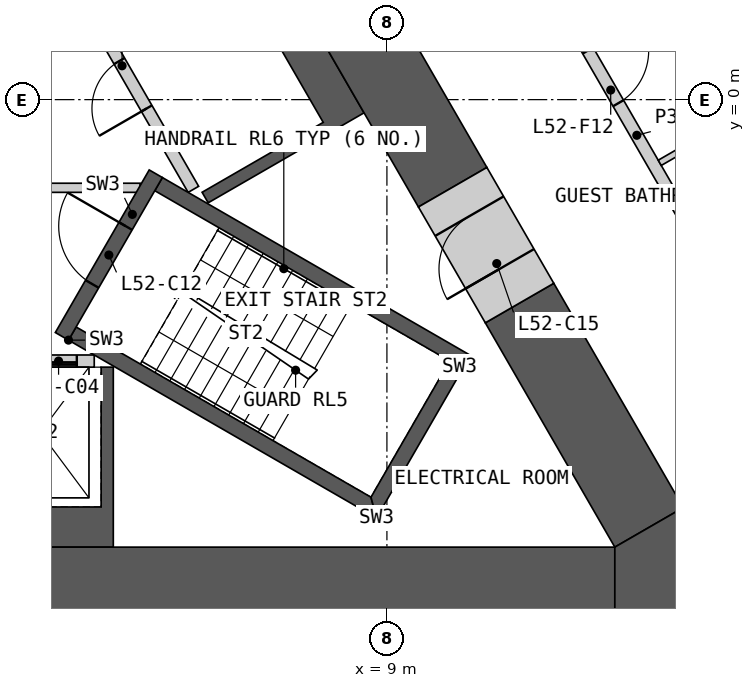
"""IFC4 building model, lengths in metres.
Left out: names, types, materials, properties, quantities, classifications, styles, units other than length and angle.
Written with IfcOpenShell. Run it as: python <this file> out.ifc"""

import sys

from ifc_helpers import new_model, si_unit, direction, frame, frame_2d, origin, place, context, subcontext, project, spatial, polyline, rectangle, outline, extrude, element, fill, save


model = new_model("IFC4")
c1 = context("Model", 3, precision=1e-05, world=origin(), true_north=direction((0.0, 1.0)))
c2 = subcontext(c1, "Body", "Model", "MODEL_VIEW")
j1 = project(units=[si_unit("LENGTHUNIT", "METRE"), si_unit("PLANEANGLEUNIT", "RADIAN")], contexts=[c1])
p1 = place(None, origin())
s1 = spatial("IfcSite", under=j1, at=p1, CompositionType="ELEMENT")
p2 = place(p1, origin())
s2 = spatial("IfcBuilding", under=s1, at=p2, CompositionType="ELEMENT")
p3 = place(p2, frame((0.0, 0.0, 238.2)))
s3 = spatial("IfcBuildingStorey", under=s2, at=p3, CompositionType="ELEMENT", Elevation=238.2)
p4 = place(p3, origin())
e1 = element("IfcWall", 1, at=p4, inside=s3, PredefinedType="SHEAR", context=c2, shape_type="SweptSolid", body=[
    extrude(outline(polyline([(2.1, -7.36), (2.1, -4.4), (2.3, -4.4), (2.3, -6.7), (4.3, -6.7), (4.3, -4.4), (4.5, -4.4), (4.5, -7.36), (2.1, -7.36)])), origin(), (0.0, 0.0, 1.0), 3.25),
])
p5 = place(p3, frame((-4.187, -4.3, 0.0), z_axis=(0.0, 0.0, 1.0), x_axis=(1.0, 0.0, 0.0)))
e2 = element("IfcWall", 2, at=p5, inside=s3, PredefinedType="SOLIDWALL", context=c2, shape_type="SweptSolid", body=[
    extrude(rectangle(XDim=8.373, YDim=0.2, at=frame_2d((4.187, 0.0))), origin(), (0.0, 0.0, 1.0), 3.25),
])
p6 = place(p5, frame((0.287, 0.0, 0.0)))
e3 = element("IfcOpeningElement", 3, at=p6, cuts=e2, PredefinedType="OPENING", context=c2, shape_type="SweptSolid", body=[
    extrude(rectangle(XDim=1.2, YDim=2.1, at=frame_2d((0.6, 1.05))), frame((0.0, 0.11, 0.0), z_axis=(0.0, -1.0, 0.0), x_axis=(1.0, 0.0, 0.0)), (0.0, 0.0, 1.0), 0.22),
])
p7 = place(p5, frame((2.387, 0.0, 0.0)))
e4 = element("IfcOpeningElement", 4, at=p7, cuts=e2, PredefinedType="OPENING", context=c2, shape_type="SweptSolid", body=[
    extrude(rectangle(XDim=1.4, YDim=2.1, at=frame_2d((0.7, 1.05))), frame((0.0, 0.11, 0.0), z_axis=(0.0, -1.0, 0.0), x_axis=(1.0, 0.0, 0.0)), (0.0, 0.0, 1.0), 0.22),
])
p8 = place(p5, frame((4.837, 0.0, 0.0)))
e5 = element("IfcOpeningElement", 5, at=p8, cuts=e2, PredefinedType="OPENING", context=c2, shape_type="SweptSolid", body=[
    extrude(rectangle(XDim=0.9, YDim=2.1, at=frame_2d((0.45, 1.05))), frame((0.0, 0.11, 0.0), z_axis=(0.0, -1.0, 0.0), x_axis=(1.0, 0.0, 0.0)), (0.0, 0.0, 1.0), 0.22),
])
p9 = place(p5, frame((6.887, 0.0, 0.0)))
e6 = element("IfcOpeningElement", 6, at=p9, cuts=e2, PredefinedType="OPENING", context=c2, shape_type="SweptSolid", body=[
    extrude(rectangle(XDim=1.2, YDim=2.1, at=frame_2d((0.6, 1.05))), frame((0.0, 0.11, 0.0), z_axis=(0.0, -1.0, 0.0), x_axis=(1.0, 0.0, 0.0)), (0.0, 0.0, 1.0), 0.22),
])
p10 = place(p3, origin())
e7 = element("IfcWall", 7, at=p10, inside=s3, PredefinedType="SHEAR", context=c2, shape_type="SweptSolid", body=[
    extrude(outline(polyline([(6.324, 3.767), (8.624, -0.217), (8.231, -0.444), (6.061, -1.697), (5.96, -1.524), (7.952, -0.374), (5.852, 3.263), (3.861, 2.113), (3.76, 2.287), (5.931, 3.54), (6.324, 3.767)])), origin(), (0.0, 0.0, 1.0), 3.25),
])
p11 = place(p3, frame((5.817, -1.476, 0.0), z_axis=(0.0, 0.0, 1.0), x_axis=(-0.500002616675, 0.866023893041, 0.0)))
e8 = element("IfcWall", 8, at=p11, inside=s3, PredefinedType="SOLIDWALL", context=c2, shape_type="SweptSolid", body=[
    extrude(rectangle(XDim=8.373, YDim=0.2, at=frame_2d((4.187, 0.0))), origin(), (0.0, 0.0, 1.0), 3.25),
])
p12 = place(p11, frame((1.537, 0.0, 0.0)))
e9 = element("IfcOpeningElement", 9, at=p12, cuts=e8, PredefinedType="OPENING", context=c2, shape_type="SweptSolid", body=[
    extrude(rectangle(XDim=0.9, YDim=2.1, at=frame_2d((0.45, 1.05))), frame((0.0, 0.11, 0.0), z_axis=(0.0, -1.0, 0.0), x_axis=(1.0, 0.0, 0.0)), (0.0, 0.0, 1.0), 0.22),
])
p13 = place(p11, frame((4.837, 0.0, 0.0)))
e10 = element("IfcOpeningElement", 10, at=p13, cuts=e8, PredefinedType="OPENING", context=c2, shape_type="SweptSolid", body=[
    extrude(rectangle(XDim=0.9, YDim=2.1, at=frame_2d((0.45, 1.05))), frame((0.0, 0.11, 0.0), z_axis=(0.0, -1.0, 0.0), x_axis=(1.0, 0.0, 0.0)), (0.0, 0.0, 1.0), 0.22),
])
p14 = place(p11, frame((6.937, 0.0, 0.0)))
e11 = element("IfcOpeningElement", 11, at=p14, cuts=e8, PredefinedType="OPENING", context=c2, shape_type="SweptSolid", body=[
    extrude(rectangle(XDim=1.1, YDim=2.1, at=frame_2d((0.55, 1.05))), frame((0.0, 0.11, 0.0), z_axis=(0.0, -1.0, 0.0), x_axis=(1.0, 0.0, 0.0)), (0.0, 0.0, 1.0), 0.22),
])
p15 = place(p3, frame((-4.941, -1.45, 0.0), z_axis=(0.0, 0.0, 1.0), x_axis=(1.0, 0.0, 0.0)))
e12 = element("IfcWall", 12, at=p15, inside=s3, PredefinedType="PARTITIONING", context=c2, shape_type="SweptSolid", body=[
    extrude(rectangle(XDim=9.882, YDim=0.15, at=frame_2d((4.941, 0.0))), origin(), (0.0, 0.0, 1.0), 3.25),
])
p16 = place(p15, frame((4.391, 0.0, 0.0)))
e13 = element("IfcOpeningElement", 13, at=p16, cuts=e12, PredefinedType="OPENING", context=c2, shape_type="SweptSolid", body=[
    extrude(rectangle(XDim=1.1, YDim=2.1, at=frame_2d((0.55, 1.05))), frame((0.0, 0.085, 0.0), z_axis=(0.0, -1.0, 0.0), x_axis=(1.0, 0.0, 0.0)), (0.0, 0.0, 1.0), 0.17),
])
p17 = place(p3, origin())
e14 = element("IfcWall", 14, at=p17, inside=s3, PredefinedType="SHEAR", context=c2, shape_type="SweptSolid", body=[
    extrude(outline(polyline([(3.763, -3.956), (8.83, -6.881), (8.738, -6.539), (3.888, -3.739), (3.763, -3.956)])), origin(), (0.0, 0.0, 1.0), 3.25),
])
p18 = place(p3, origin())
e15 = element("IfcWall", 15, at=p18, inside=s3, PredefinedType="SHEAR", context=c2, shape_type="SweptSolid", body=[
    extrude(outline(polyline([(8.83, -6.881), (10.374, -4.206), (10.032, -4.298), (8.738, -6.539), (8.83, -6.881)])), origin(), (0.0, 0.0, 1.0), 3.25),
])
p19 = place(p3, origin())
e16 = element("IfcWall", 16, at=p19, inside=s3, PredefinedType="SHEAR", context=c2, shape_type="SweptSolid", body=[
    extrude(outline(polyline([(10.032, -4.298), (10.374, -4.206), (5.307, -1.281), (5.182, -1.498), (10.032, -4.298)])), origin(), (0.0, 0.0, 1.0), 3.25),
])
p20 = place(p3, frame((3.655, -3.893, 0.0), z_axis=(0.0, 0.0, 1.0), x_axis=(0.499982516597, 0.866035497597, 0.0)))
e17 = element("IfcWall", 17, at=p20, inside=s3, PredefinedType="SHEAR", context=c2, shape_type="SweptSolid", body=[
    extrude(rectangle(XDim=3.088, YDim=0.25, at=frame_2d((1.544, 0.0))), origin(), (0.0, 0.0, 1.0), 3.25),
])
p21 = place(p20, frame((0.994, 0.0, 0.0)))
e18 = element("IfcOpeningElement", 18, at=p21, cuts=e17, PredefinedType="OPENING", context=c2, shape_type="SweptSolid", body=[
    extrude(rectangle(XDim=1.1, YDim=2.1, at=frame_2d((0.55, 1.05))), frame((0.0, 0.135, 0.0), z_axis=(0.0, -1.0, 0.0), x_axis=(1.0, 0.0, 0.0)), (0.0, 0.0, 1.0), 0.27),
])
p22 = place(p3, frame((-12.748, -8.01, 0.0), z_axis=(0.0, 0.0, 1.0), x_axis=(1.0, 0.0, 0.0)))
e19 = element("IfcWall", 19, at=p22, inside=s3, PredefinedType="SHEAR", context=c2, shape_type="SweptSolid", body=[
    extrude(rectangle(XDim=25.497, YDim=1.3, at=frame_2d((12.748, 0.0))), origin(), (0.0, 0.0, 1.0), 3.25),
])
p23 = place(p3, frame((10.081, -1.441, 0.0), z_axis=(0.0, 0.0, 1.0), x_axis=(-0.500012180433, 0.866018371294, 0.0)))
e20 = element("IfcWall", 20, at=p23, inside=s3, PredefinedType="SHEAR", context=c2, shape_type="SweptSolid", body=[
    extrude(rectangle(XDim=15.05, YDim=1.3, at=frame_2d((7.525, 0.0))), origin(), (0.0, 0.0, 1.0), 3.25),
])
p24 = place(p3, frame((13.311, -7.035, 0.0), z_axis=(0.0, 0.0, 1.0), x_axis=(-0.500003555838, 0.866023350811, 0.0)))
e21 = element("IfcWall", 21, at=p24, inside=s3, PredefinedType="SHEAR", context=c2, shape_type="SweptSolid", body=[
    extrude(rectangle(XDim=4.26, YDim=1.3, at=frame_2d((2.13, 0.0))), origin(), (0.0, 0.0, 1.0), 3.25),
])
p25 = place(p3, origin())
e22 = element("IfcWall", 22, at=p25, inside=s3, PredefinedType="SHEAR", context=c2, shape_type="SweptSolid", body=[
    extrude(outline(polyline([(12.748, -8.66), (12.748, -7.36), (13.874, -6.71), (15.0, -8.66), (12.748, -8.66)])), origin(), (0.0, 0.0, 1.0), 3.25),
])
p26 = place(p3, frame((11.181, -3.346, 0.0), z_axis=(0.0, 0.0, 1.0), x_axis=(-0.499946605688, 0.86605622881, 0.0)))
e23 = element("IfcWall", 23, at=p26, inside=s3, PredefinedType="SHEAR", context=c2, shape_type="SweptSolid", body=[
    extrude(rectangle(XDim=2.2, YDim=1.3, at=frame_2d((1.1, 0.0))), origin(), (0.0, 0.0, 1.0), 3.25),
])
p27 = place(p26, frame((0.65, 0.0, 0.0)))
e24 = element("IfcOpeningElement", 24, at=p27, cuts=e23, PredefinedType="OPENING", context=c2, shape_type="SweptSolid", body=[
    extrude(rectangle(XDim=1.0, YDim=2.1, at=frame_2d((0.5, 1.05))), frame((0.0, 0.66, 0.0), z_axis=(0.0, -1.0, 0.0), x_axis=(1.0, 0.0, 0.0)), (0.0, 0.0, 1.0), 1.32),
])
p28 = place(p3, frame((9.699, 5.321, 0.0), z_axis=(0.0, 0.0, 1.0), x_axis=(0.49998193945, -0.866035830797, 0.0)))
e25 = element("IfcWall", 25, at=p28, inside=s3, PredefinedType="PARTITIONING", context=c2, shape_type="SweptSolid", body=[
    extrude(rectangle(XDim=9.094, YDim=0.2, at=frame_2d((4.547, 0.0))), origin(), (0.0, 0.0, 1.0), 3.25),
])
p29 = place(p28, frame((5.212, 0.0, 0.0)))
e26 = element("IfcOpeningElement", 26, at=p29, cuts=e25, PredefinedType="OPENING", context=c2, shape_type="SweptSolid", body=[
    extrude(rectangle(XDim=1.0, YDim=2.1, at=frame_2d((0.5, 1.05))), frame((0.0, 0.11, 0.0), z_axis=(0.0, -1.0, 0.0), x_axis=(1.0, 0.0, 0.0)), (0.0, 0.0, 1.0), 0.22),
])
p30 = place(p28, frame((1.162, 0.0, 0.0)))
e27 = element("IfcOpeningElement", 27, at=p30, cuts=e25, PredefinedType="OPENING", context=c2, shape_type="SweptSolid", body=[
    extrude(rectangle(XDim=1.1, YDim=2.1, at=frame_2d((0.55, 1.05))), frame((0.0, 0.11, 0.0), z_axis=(0.0, -1.0, 0.0), x_axis=(1.0, 0.0, 0.0)), (0.0, 0.0, 1.0), 0.22),
])
p31 = place(p3, frame((13.487, -1.04, 0.0), z_axis=(0.0, 0.0, 1.0), x_axis=(0.866032905446, 0.499987006516, 0.0)))
e28 = element("IfcWall", 28, at=p31, inside=s3, PredefinedType="PARTITIONING", context=c2, shape_type="SweptSolid", body=[
    extrude(rectangle(XDim=2.45, YDim=0.1, at=frame_2d((1.225, 0.0))), origin(), (0.0, 0.0, 1.0), 2.404),
])
p32 = place(p9, origin())
e29 = element("IfcDoor", 29, at=p32, inside=s3, OperationType="SLIDING_TO_LEFT", PredefinedType="DOOR", context=c2, shape_type="SweptSolid", body=[
    extrude(rectangle(XDim=1.2, YDim=2.1, at=frame_2d((0.6, 1.05))), frame((0.0, 0.025, 0.0), z_axis=(0.0, -1.0, 0.0), x_axis=(1.0, 0.0, 0.0)), (0.0, 0.0, 1.0), 0.05),
])
fill(e6, e29)
p33 = place(p12, origin())
e30 = element("IfcDoor", 30, at=p33, inside=s3, OperationType="SINGLE_SWING_LEFT", PredefinedType="DOOR", context=c2, shape_type="SweptSolid", body=[
    extrude(rectangle(XDim=0.9, YDim=2.1, at=frame_2d((0.45, 1.05))), frame((0.0, 0.025, 0.0), z_axis=(0.0, -1.0, 0.0), x_axis=(1.0, 0.0, 0.0)), (0.0, 0.0, 1.0), 0.05),
])
fill(e9, e30)
p34 = place(p21, origin())
e31 = element("IfcDoor", 31, at=p34, inside=s3, OperationType="SINGLE_SWING_RIGHT", PredefinedType="DOOR", context=c2, shape_type="SweptSolid", body=[
    extrude(rectangle(XDim=1.1, YDim=2.1, at=frame_2d((0.55, 1.05))), frame((0.0, 0.025, 0.0), z_axis=(0.0, -1.0, 0.0), x_axis=(1.0, 0.0, 0.0)), (0.0, 0.0, 1.0), 0.05),
])
fill(e18, e31)
p35 = place(p27, origin())
e32 = element("IfcDoor", 32, at=p35, inside=s3, OperationType="SINGLE_SWING_LEFT", PredefinedType="DOOR", context=c2, shape_type="SweptSolid", body=[
    extrude(rectangle(XDim=1.0, YDim=2.1, at=frame_2d((0.5, 1.05))), frame((0.0, 0.405, 0.0), z_axis=(0.0, -1.0, 0.0), x_axis=(1.0, 0.0, 0.0)), (0.0, 0.0, 1.0), 0.05),
])
fill(e24, e32)
p36 = place(p29, origin())
e33 = element("IfcDoor", 33, at=p36, inside=s3, OperationType="SINGLE_SWING_LEFT", PredefinedType="DOOR", context=c2, shape_type="SweptSolid", body=[
    extrude(rectangle(XDim=1.0, YDim=2.1, at=frame_2d((0.5, 1.05))), frame((0.0, 0.025, 0.0), z_axis=(0.0, -1.0, 0.0), x_axis=(1.0, 0.0, 0.0)), (0.0, 0.0, 1.0), 0.05),
])
fill(e26, e33)
save(model, sys.argv[1])
